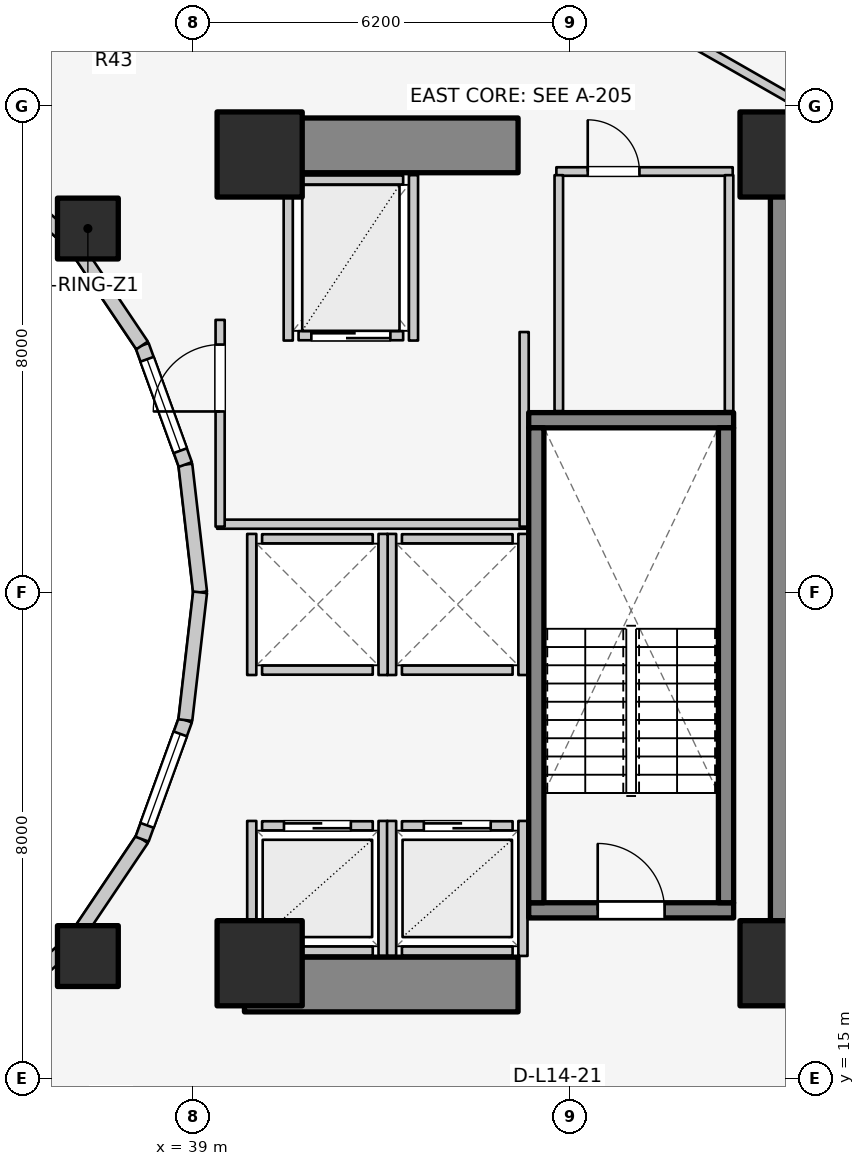
"""IFC4 building model, lengths in metres.
Left out: names, types, materials, properties, quantities, classifications, styles, units other than length and angle.
Written with IfcOpenShell. Run it as: python <this file> out.ifc"""

import sys

from ifc_helpers import new_model, si_unit, direction, frame, frame_2d, origin, origin_2d, place, context, subcontext, project, spatial, rectangle, extrude, element, fill, save


model = new_model("IFC4")
c1 = context("Model", 3, precision=1e-05, world=origin(), true_north=direction((0.0, 1.0)))
c2 = subcontext(c1, "Body", "Model", "MODEL_VIEW")
j1 = project(units=[si_unit("LENGTHUNIT", "METRE"), si_unit("PLANEANGLEUNIT", "RADIAN")], contexts=[c1])
p1 = place(None, origin())
s1 = spatial("IfcSite", under=j1, at=p1, CompositionType="ELEMENT")
p2 = place(p1, origin())
s2 = spatial("IfcBuilding", under=s1, at=p2, CompositionType="ELEMENT")
p3 = place(p2, frame((0.0, 0.0, 49.3)))
s3 = spatial("IfcBuildingStorey", under=s2, at=p3, CompositionType="ELEMENT", Elevation=49.3)
p4 = place(p3, frame((48.95, 17.05, 0.0), z_axis=(0.0, 0.0, 1.0), x_axis=(0.0, 1.0, 0.0)))
e1 = element("IfcWall", 1, at=p4, inside=s3, PredefinedType="SHEAR", context=c2, shape_type="SweptSolid", body=[
    extrude(rectangle(XDim=12.8, YDim=0.9, at=frame_2d((6.4, 0.0))), origin(), (0.0, 0.0, 1.0), 3.1),
])
for number, where, z_axis, x_axis in (
    (2, (39.85, 16.55, 0.0), (0.0, 0.0, 1.0), (1.0, 0.0, 0.0)),
    (3, (39.85, 30.35, 0.0), (0.0, 0.0, 1.0), (1.0, 0.0, 0.0)),
):
    element("IfcWall", number, at=place(p3, frame(where, z_axis=z_axis, x_axis=x_axis)), inside=s3, PredefinedType="SHEAR", context=c2, shape_type="SweptSolid", body=[
        extrude(rectangle(XDim=4.5, YDim=0.9, at=frame_2d((2.25, 0.0))), origin(), (0.0, 0.0, 1.0), 3.1),
    ])
p5 = place(p3, frame((44.525, 17.77, 0.0), z_axis=(0.0, 0.0, 1.0), x_axis=(1.0, 0.0, 0.0)))
e4 = element("IfcWall", 4, at=p5, inside=s3, PredefinedType="SOLIDWALL", context=c2, shape_type="SweptSolid", body=[
    extrude(rectangle(XDim=3.37, YDim=0.25, at=frame_2d((1.685, 0.0))), origin(), (0.0, 0.0, 1.0), 3.1),
])
p6 = place(p5, frame((1.135, 0.0, 0.0)))
e5 = element("IfcOpeningElement", 5, at=p6, cuts=e4, PredefinedType="OPENING", context=c2, shape_type="SweptSolid", body=[
    extrude(rectangle(XDim=1.1, YDim=2.1, at=frame_2d((0.55, 1.05))), frame((0.0, 0.135, 0.0), z_axis=(0.0, -1.0, 0.0), x_axis=(1.0, 0.0, 0.0)), (0.0, 0.0, 1.0), 0.27),
])
p7 = place(p3, frame((44.525, 25.83, 0.0), z_axis=(0.0, 0.0, 1.0), x_axis=(1.0, 0.0, 0.0)))
e6 = element("IfcWall", 6, at=p7, inside=s3, PredefinedType="SOLIDWALL", context=c2, shape_type="SweptSolid", body=[
    extrude(rectangle(XDim=3.37, YDim=0.25, at=frame_2d((1.685, 0.0))), origin(), (0.0, 0.0, 1.0), 3.1),
])
for number, where, z_axis, x_axis in (
    (7, (44.65, 17.895, 0.0), (0.0, 0.0, 1.0), (0.0, 1.0, 0.0)),
    (8, (47.77, 17.895, 0.0), (0.0, 0.0, 1.0), (0.0, 1.0, 0.0)),
):
    element("IfcWall", number, at=place(p3, frame(where, z_axis=z_axis, x_axis=x_axis)), inside=s3, PredefinedType="SOLIDWALL", context=c2, shape_type="SweptSolid", body=[
        extrude(rectangle(XDim=7.81, YDim=0.25, at=frame_2d((3.905, 0.0))), origin(), (0.0, 0.0, 1.0), 3.1),
    ])
for number, where, z_axis, x_axis in (
    (9, (40.1, 16.9, 0.0), (0.0, 0.0, 1.0), (1.0, 0.0, 0.0)),
    (10, (48.7, 16.9, 0.0), (0.0, 0.0, 1.0), (1.0, 0.0, 0.0)),
    (11, (48.7, 30.2, 0.0), (0.0, 0.0, 1.0), (1.0, 0.0, 0.0)),
    (12, (40.1, 30.2, 0.0), (0.0, 0.0, 1.0), (1.0, 0.0, 0.0)),
):
    element("IfcColumn", number, at=place(p3, frame(where, z_axis=z_axis, x_axis=x_axis)), inside=s3, PredefinedType="COLUMN", context=c2, shape_type="SweptSolid", body=[
        extrude(rectangle(XDim=1.4, YDim=1.4, at=origin_2d()), origin(), (0.0, 0.0, 1.0), 3.1),
    ])
for number, where, z_axis, x_axis in (
    (13, (37.275, 28.982, 0.0), (0.0, 0.0, 1.0), (1.0, 0.0, 0.0)),
    (14, (37.275, 17.018, 0.0), (0.0, 0.0, 1.0), (1.0, 0.0, 0.0)),
):
    element("IfcColumn", number, at=place(p3, frame(where, z_axis=z_axis, x_axis=x_axis)), inside=s3, PredefinedType="COLUMN", context=c2, shape_type="SweptSolid", body=[
        extrude(rectangle(XDim=1.0, YDim=1.0, at=origin_2d()), origin(), (0.0, 0.0, 1.0), 3.1),
    ])
p8 = place(p3, frame((39.12, 23.0, 0.0), z_axis=(0.0, 0.0, 1.0), x_axis=(-0.114711713601, 0.993398823617, 0.0)))
e15 = element("IfcWall", 15, at=p8, inside=s3, PredefinedType="STANDARD", context=c2, shape_type="SweptSolid", body=[
    extrude(rectangle(XDim=2.115, YDim=0.23, at=frame_2d((1.058, 0.0))), origin(), (0.0, 0.0, 1.0), 2.84),
])
p9 = place(p3, frame((38.877, 25.102, 0.0), z_axis=(0.0, 0.0, 1.0), x_axis=(-0.341423187295, 0.93990968033, 0.0)))
e16 = element("IfcWall", 16, at=p9, inside=s3, PredefinedType="STANDARD", context=c2, shape_type="SweptSolid", body=[
    extrude(rectangle(XDim=2.084, YDim=0.23, at=frame_2d((1.042, 0.0))), origin(), (0.0, 0.0, 1.0), 2.84),
])
p10 = place(p9, frame((0.242, 0.0, 0.85)))
e17 = element("IfcOpeningElement", 17, at=p10, cuts=e16, PredefinedType="OPENING", context=c2, shape_type="SweptSolid", body=[
    extrude(rectangle(XDim=1.6, YDim=1.65, at=frame_2d((0.8, 0.825))), frame((0.0, 0.125, 0.0), z_axis=(0.0, -1.0, 0.0), x_axis=(1.0, 0.0, 0.0)), (0.0, 0.0, 1.0), 0.25),
])
p11 = place(p3, frame((38.166, 27.06, 0.0), z_axis=(0.0, 0.0, 1.0), x_axis=(-0.558197800898, 0.829707909492, 0.0)))
e18 = element("IfcWall", 18, at=p11, inside=s3, PredefinedType="STANDARD", context=c2, shape_type="SweptSolid", body=[
    extrude(rectangle(XDim=2.027, YDim=0.23, at=frame_2d((1.013, 0.0))), origin(), (0.0, 0.0, 1.0), 2.16),
])
for number, where, z_axis, x_axis in (
    (19, (37.035, 28.742, 0.0), (0.0, 0.0, 1.0), (-0.753, 0.659, 0.0)),
    (20, (35.56, 15.968, 0.0), (0.0, 0.0, 1.0), (0.753, 0.659, 0.0)),
):
    element("IfcWall", number, at=place(p3, frame(where, z_axis=z_axis, x_axis=x_axis)), inside=s3, PredefinedType="STANDARD", context=c2, shape_type="SweptSolid", body=[
        extrude(rectangle(XDim=1.959, YDim=0.23, at=frame_2d((0.98, 0.0))), origin(), (0.0, 0.0, 1.0), 2.16),
    ])
p12 = place(p3, frame((37.035, 17.258, 0.0), z_axis=(0.0, 0.0, 1.0), x_axis=(0.558197800898, 0.829707909492, 0.0)))
e21 = element("IfcWall", 21, at=p12, inside=s3, PredefinedType="STANDARD", context=c2, shape_type="SweptSolid", body=[
    extrude(rectangle(XDim=2.027, YDim=0.23, at=frame_2d((1.013, 0.0))), origin(), (0.0, 0.0, 1.0), 2.16),
])
p13 = place(p3, frame((38.166, 18.94, 0.0), z_axis=(0.0, 0.0, 1.0), x_axis=(0.341423187295, 0.93990968033, 0.0)))
e22 = element("IfcWall", 22, at=p13, inside=s3, PredefinedType="STANDARD", context=c2, shape_type="SweptSolid", body=[
    extrude(rectangle(XDim=2.084, YDim=0.23, at=frame_2d((1.042, 0.0))), origin(), (0.0, 0.0, 1.0), 2.84),
])
p14 = place(p13, frame((0.242, 0.0, 0.85)))
e23 = element("IfcOpeningElement", 23, at=p14, cuts=e22, PredefinedType="OPENING", context=c2, shape_type="SweptSolid", body=[
    extrude(rectangle(XDim=1.6, YDim=1.65, at=frame_2d((0.8, 0.825))), frame((0.0, 0.125, 0.0), z_axis=(0.0, -1.0, 0.0), x_axis=(1.0, 0.0, 0.0)), (0.0, 0.0, 1.0), 0.25),
])
p15 = place(p3, frame((38.877, 20.898, 0.0), z_axis=(0.0, 0.0, 1.0), x_axis=(0.114711713601, 0.993398823617, 0.0)))
e24 = element("IfcWall", 24, at=p15, inside=s3, PredefinedType="STANDARD", context=c2, shape_type="SweptSolid", body=[
    extrude(rectangle(XDim=2.115, YDim=0.23, at=frame_2d((1.058, 0.0))), origin(), (0.0, 0.0, 1.0), 2.84),
])
p16 = place(p3, frame((40.14, 19.16, 0.0), z_axis=(0.0, 0.0, 1.0), x_axis=(1.0, 0.0, 0.0)))
e25 = element("IfcWall", 25, at=p16, inside=s3, PredefinedType="SOLIDWALL", context=c2, shape_type="SweptSolid", body=[
    extrude(rectangle(XDim=1.82, YDim=0.15, at=frame_2d((0.91, 0.0))), origin(), (0.0, 0.0, 1.0), 2.12),
])
p17 = place(p16, frame((0.36, 0.0, 0.0)))
e26 = element("IfcOpeningElement", 26, at=p17, cuts=e25, PredefinedType="OPENING", context=c2, shape_type="SweptSolid", body=[
    extrude(rectangle(XDim=1.1, YDim=2.1, at=frame_2d((0.55, 1.05))), frame((0.0, 0.085, 0.0), z_axis=(0.0, -1.0, 0.0), x_axis=(1.0, 0.0, 0.0)), (0.0, 0.0, 1.0), 0.17),
])
p18 = place(p3, frame((40.14, 17.1, 0.0), z_axis=(0.0, 0.0, 1.0), x_axis=(1.0, 0.0, 0.0)))
e27 = element("IfcWall", 27, at=p18, inside=s3, PredefinedType="SOLIDWALL", context=c2, shape_type="SweptSolid", body=[
    extrude(rectangle(XDim=1.82, YDim=0.15, at=frame_2d((0.91, 0.0))), origin(), (0.0, 0.0, 1.0), 2.12),
])
p19 = place(p3, frame((39.97, 17.02, 0.0), z_axis=(0.0, 0.0, 1.0), x_axis=(0.0, 1.0, 0.0)))
e28 = element("IfcWall", 28, at=p19, inside=s3, PredefinedType="SOLIDWALL", context=c2, shape_type="SweptSolid", body=[
    extrude(rectangle(XDim=2.22, YDim=0.15, at=frame_2d((1.11, 0.0))), origin(), (0.0, 0.0, 1.0), 2.12),
])
p20 = place(p3, frame((42.13, 17.02, 0.0), z_axis=(0.0, 0.0, 1.0), x_axis=(0.0, 1.0, 0.0)))
e29 = element("IfcWall", 29, at=p20, inside=s3, PredefinedType="SOLIDWALL", context=c2, shape_type="SweptSolid", body=[
    extrude(rectangle(XDim=2.22, YDim=0.15, at=frame_2d((1.11, 0.0))), origin(), (0.0, 0.0, 1.0), 2.855),
])
p21 = place(p3, frame((42.44, 19.16, 0.0), z_axis=(0.0, 0.0, 1.0), x_axis=(1.0, 0.0, 0.0)))
e30 = element("IfcWall", 30, at=p21, inside=s3, PredefinedType="SOLIDWALL", context=c2, shape_type="SweptSolid", body=[
    extrude(rectangle(XDim=1.82, YDim=0.15, at=frame_2d((0.91, 0.0))), origin(), (0.0, 0.0, 1.0), 2.855),
])
p22 = place(p21, frame((0.36, 0.0, 0.0)))
e31 = element("IfcOpeningElement", 31, at=p22, cuts=e30, PredefinedType="OPENING", context=c2, shape_type="SweptSolid", body=[
    extrude(rectangle(XDim=1.1, YDim=2.1, at=frame_2d((0.55, 1.05))), frame((0.0, 0.085, 0.0), z_axis=(0.0, -1.0, 0.0), x_axis=(1.0, 0.0, 0.0)), (0.0, 0.0, 1.0), 0.17),
])
p23 = place(p3, frame((42.44, 17.1, 0.0), z_axis=(0.0, 0.0, 1.0), x_axis=(1.0, 0.0, 0.0)))
e32 = element("IfcWall", 32, at=p23, inside=s3, PredefinedType="SOLIDWALL", context=c2, shape_type="SweptSolid", body=[
    extrude(rectangle(XDim=1.82, YDim=0.15, at=frame_2d((0.91, 0.0))), origin(), (0.0, 0.0, 1.0), 2.855),
])
p24 = place(p3, frame((42.27, 17.02, 0.0), z_axis=(0.0, 0.0, 1.0), x_axis=(0.0, 1.0, 0.0)))
e33 = element("IfcWall", 33, at=p24, inside=s3, PredefinedType="SOLIDWALL", context=c2, shape_type="SweptSolid", body=[
    extrude(rectangle(XDim=2.22, YDim=0.15, at=frame_2d((1.11, 0.0))), origin(), (0.0, 0.0, 1.0), 2.855),
])
p25 = place(p3, frame((44.43, 17.02, 0.0), z_axis=(0.0, 0.0, 1.0), x_axis=(0.0, 1.0, 0.0)))
e34 = element("IfcWall", 34, at=p25, inside=s3, PredefinedType="SOLIDWALL", context=c2, shape_type="SweptSolid", body=[
    extrude(rectangle(XDim=2.22, YDim=0.15, at=frame_2d((1.11, 0.0))), origin(), (0.0, 0.0, 1.0), 2.12),
])
for number, where, z_axis, x_axis in (
    (35, (42.44, 21.72, 0.0), (0.0, 0.0, 1.0), (1.0, 0.0, 0.0)),
    (36, (42.44, 23.88, 0.0), (0.0, 0.0, 1.0), (1.0, 0.0, 0.0)),
):
    element("IfcWall", number, at=place(p3, frame(where, z_axis=z_axis, x_axis=x_axis)), inside=s3, PredefinedType="SOLIDWALL", context=c2, shape_type="SweptSolid", body=[
        extrude(rectangle(XDim=1.82, YDim=0.15, at=frame_2d((0.91, 0.0))), origin(), (0.0, 0.0, 1.0), 2.855),
    ])
for number, where, z_axis, x_axis in (
    (37, (42.27, 21.64, 0.0), (0.0, 0.0, 1.0), (0.0, 1.0, 0.0)),
    (38, (44.43, 21.64, 0.0), (0.0, 0.0, 1.0), (0.0, 1.0, 0.0)),
):
    element("IfcWall", number, at=place(p3, frame(where, z_axis=z_axis, x_axis=x_axis)), inside=s3, PredefinedType="SOLIDWALL", context=c2, shape_type="SweptSolid", body=[
        extrude(rectangle(XDim=2.32, YDim=0.15, at=frame_2d((1.16, 0.0))), origin(), (0.0, 0.0, 1.0), 2.855),
    ])
for number, where, z_axis, x_axis in (
    (39, (40.14, 21.72, 0.0), (0.0, 0.0, 1.0), (1.0, 0.0, 0.0)),
    (40, (40.14, 23.88, 0.0), (0.0, 0.0, 1.0), (1.0, 0.0, 0.0)),
):
    element("IfcWall", number, at=place(p3, frame(where, z_axis=z_axis, x_axis=x_axis)), inside=s3, PredefinedType="SOLIDWALL", context=c2, shape_type="SweptSolid", body=[
        extrude(rectangle(XDim=1.82, YDim=0.15, at=frame_2d((0.91, 0.0))), origin(), (0.0, 0.0, 1.0), 2.12),
    ])
p26 = place(p3, frame((39.97, 21.64, 0.0), z_axis=(0.0, 0.0, 1.0), x_axis=(0.0, 1.0, 0.0)))
e41 = element("IfcWall", 41, at=p26, inside=s3, PredefinedType="SOLIDWALL", context=c2, shape_type="SweptSolid", body=[
    extrude(rectangle(XDim=2.32, YDim=0.15, at=frame_2d((1.16, 0.0))), origin(), (0.0, 0.0, 1.0), 2.12),
])
p27 = place(p3, frame((42.13, 21.64, 0.0), z_axis=(0.0, 0.0, 1.0), x_axis=(0.0, 1.0, 0.0)))
e42 = element("IfcWall", 42, at=p27, inside=s3, PredefinedType="SOLIDWALL", context=c2, shape_type="SweptSolid", body=[
    extrude(rectangle(XDim=2.32, YDim=0.15, at=frame_2d((1.16, 0.0))), origin(), (0.0, 0.0, 1.0), 2.855),
])
p28 = place(p3, frame((40.74, 27.22, 0.0), z_axis=(0.0, 0.0, 1.0), x_axis=(1.0, 0.0, 0.0)))
e43 = element("IfcWall", 43, at=p28, inside=s3, PredefinedType="SOLIDWALL", context=c2, shape_type="SweptSolid", body=[
    extrude(rectangle(XDim=1.72, YDim=0.15, at=frame_2d((0.86, 0.0))), origin(), (0.0, 0.0, 1.0), 2.855),
])
p29 = place(p28, frame((0.21, 0.0, 0.0)))
e44 = element("IfcOpeningElement", 44, at=p29, cuts=e43, PredefinedType="OPENING", context=c2, shape_type="SweptSolid", body=[
    extrude(rectangle(XDim=1.3, YDim=2.1, at=frame_2d((0.65, 1.05))), frame((0.0, 0.085, 0.0), z_axis=(0.0, -1.0, 0.0), x_axis=(1.0, 0.0, 0.0)), (0.0, 0.0, 1.0), 0.17),
])
p30 = place(p3, frame((40.74, 29.78, 0.0), z_axis=(0.0, 0.0, 1.0), x_axis=(1.0, 0.0, 0.0)))
e45 = element("IfcWall", 45, at=p30, inside=s3, PredefinedType="SOLIDWALL", context=c2, shape_type="SweptSolid", body=[
    extrude(rectangle(XDim=1.72, YDim=0.15, at=frame_2d((0.86, 0.0))), origin(), (0.0, 0.0, 1.0), 2.855),
])
for number, where, z_axis, x_axis in (
    (46, (40.57, 27.14, 0.0), (0.0, 0.0, 1.0), (0.0, 1.0, 0.0)),
    (47, (42.63, 27.14, 0.0), (0.0, 0.0, 1.0), (0.0, 1.0, 0.0)),
):
    element("IfcWall", number, at=place(p3, frame(where, z_axis=z_axis, x_axis=x_axis)), inside=s3, PredefinedType="SOLIDWALL", context=c2, shape_type="SweptSolid", body=[
        extrude(rectangle(XDim=2.72, YDim=0.15, at=frame_2d((1.36, 0.0))), origin(), (0.0, 0.0, 1.0), 2.855),
    ])
p31 = place(p3, frame((39.4, 24.12, 0.0), z_axis=(0.0, 0.0, 1.0), x_axis=(1.0, 0.0, 0.0)))
e48 = element("IfcWall", 48, at=p31, inside=s3, PredefinedType="PARTITIONING", context=c2, shape_type="SweptSolid", body=[
    extrude(rectangle(XDim=5.08, YDim=0.15, at=frame_2d((2.54, 0.0))), origin(), (0.0, 0.0, 1.0), 2.12),
])
p32 = place(p3, frame((44.45, 24.08, 0.0), z_axis=(0.0, 0.0, 1.0), x_axis=(0.0, 1.0, 0.0)))
e49 = element("IfcWall", 49, at=p32, inside=s3, PredefinedType="PARTITIONING", context=c2, shape_type="SweptSolid", body=[
    extrude(rectangle(XDim=3.2, YDim=0.15, at=frame_2d((1.6, 0.0))), origin(), (0.0, 0.0, 1.0), 2.855),
])
p33 = place(p3, frame((39.45, 24.08, 0.0), z_axis=(0.0, 0.0, 1.0), x_axis=(0.0, 1.0, 0.0)))
e50 = element("IfcWall", 50, at=p33, inside=s3, PredefinedType="PARTITIONING", context=c2, shape_type="SweptSolid", body=[
    extrude(rectangle(XDim=3.4, YDim=0.15, at=frame_2d((1.7, 0.0))), origin(), (0.0, 0.0, 1.0), 2.855),
])
p34 = place(p33, frame((1.894, 0.0, 0.0)))
e51 = element("IfcOpeningElement", 51, at=p34, cuts=e50, PredefinedType="OPENING", context=c2, shape_type="SweptSolid", body=[
    extrude(rectangle(XDim=1.1, YDim=2.1, at=frame_2d((0.55, 1.05))), frame((0.0, 0.085, 0.0), z_axis=(0.0, -1.0, 0.0), x_axis=(1.0, 0.0, 0.0)), (0.0, 0.0, 1.0), 0.17),
])
p35 = place(p3, frame((44.98, 29.92, 0.0), z_axis=(0.0, 0.0, 1.0), x_axis=(1.0, 0.0, 0.0)))
e52 = element("IfcWall", 52, at=p35, inside=s3, PredefinedType="PLUMBINGWALL", context=c2, shape_type="SweptSolid", body=[
    extrude(rectangle(XDim=2.9, YDim=0.14, at=frame_2d((1.45, 0.0))), origin(), (0.0, 0.0, 1.0), 2.855),
])
p36 = place(p35, frame((0.516, 0.0, 0.0)))
e53 = element("IfcOpeningElement", 53, at=p36, cuts=e52, PredefinedType="OPENING", context=c2, shape_type="SweptSolid", body=[
    extrude(rectangle(XDim=0.85, YDim=2.05, at=frame_2d((0.425, 1.025))), frame((0.0, 0.08, 0.0), z_axis=(0.0, -1.0, 0.0), x_axis=(1.0, 0.0, 0.0)), (0.0, 0.0, 1.0), 0.16),
])
for number, where, z_axis, x_axis in (
    (54, (45.02, 25.98, 0.0), (0.0, 0.0, 1.0), (0.0, 1.0, 0.0)),
    (55, (47.82, 25.98, 0.0), (0.0, 0.0, 1.0), (0.0, 1.0, 0.0)),
):
    element("IfcWall", number, at=place(p3, frame(where, z_axis=z_axis, x_axis=x_axis)), inside=s3, PredefinedType="PLUMBINGWALL", context=c2, shape_type="SweptSolid", body=[
        extrude(rectangle(XDim=3.88, YDim=0.14, at=frame_2d((1.94, 0.0))), origin(), (0.0, 0.0, 1.0), 2.855),
    ])
p37 = place(p3, frame((46.757, 32.305, 0.0), z_axis=(0.0, 0.0, 1.0), x_axis=(0.867991349648, -0.496579315857, 0.0)))
e56 = element("IfcWall", 56, at=p37, inside=s3, PredefinedType="PARTITIONING", context=c2, shape_type="SweptSolid", body=[
    extrude(rectangle(XDim=2.567, YDim=0.15, at=frame_2d((1.283, 0.0))), origin(), (0.0, 0.0, 1.0), 2.069),
])
p38 = place(p10, origin())
e57 = element("IfcWindow", 57, at=p38, inside=s3, PartitioningType="SINGLE_PANEL", PredefinedType="WINDOW", context=c2, shape_type="SweptSolid", body=[
    extrude(rectangle(XDim=1.6, YDim=1.65, at=frame_2d((0.8, 0.825))), frame((0.0, 0.03, 0.0), z_axis=(0.0, -1.0, 0.0), x_axis=(1.0, 0.0, 0.0)), (0.0, 0.0, 1.0), 0.06),
])
fill(e17, e57)
p39 = place(p14, origin())
e58 = element("IfcWindow", 58, at=p39, inside=s3, PartitioningType="SINGLE_PANEL", PredefinedType="WINDOW", context=c2, shape_type="SweptSolid", body=[
    extrude(rectangle(XDim=1.6, YDim=1.65, at=frame_2d((0.8, 0.825))), frame((0.0, 0.03, 0.0), z_axis=(0.0, -1.0, 0.0), x_axis=(1.0, 0.0, 0.0)), (0.0, 0.0, 1.0), 0.06),
])
fill(e23, e58)
p40 = place(p6, origin())
e59 = element("IfcDoor", 59, at=p40, inside=s3, OperationType="SINGLE_SWING_LEFT", PredefinedType="DOOR", context=c2, shape_type="SweptSolid", body=[
    extrude(rectangle(XDim=1.1, YDim=2.1, at=frame_2d((0.55, 1.05))), frame((0.0, 0.025, 0.0), z_axis=(0.0, -1.0, 0.0), x_axis=(1.0, 0.0, 0.0)), (0.0, 0.0, 1.0), 0.05),
])
fill(e5, e59)
p41 = place(p17, origin())
e60 = element("IfcDoor", 60, at=p41, inside=s3, OperationType="DOUBLE_DOOR_SLIDING", PredefinedType="DOOR", context=c2, shape_type="SweptSolid", body=[
    extrude(rectangle(XDim=1.1, YDim=2.1, at=frame_2d((0.55, 1.05))), frame((0.0, 0.025, 0.0), z_axis=(0.0, -1.0, 0.0), x_axis=(1.0, 0.0, 0.0)), (0.0, 0.0, 1.0), 0.05),
])
fill(e26, e60)
p42 = place(p22, origin())
e61 = element("IfcDoor", 61, at=p42, inside=s3, OperationType="DOUBLE_DOOR_SLIDING", PredefinedType="DOOR", context=c2, shape_type="SweptSolid", body=[
    extrude(rectangle(XDim=1.1, YDim=2.1, at=frame_2d((0.55, 1.05))), frame((0.0, 0.025, 0.0), z_axis=(0.0, -1.0, 0.0), x_axis=(1.0, 0.0, 0.0)), (0.0, 0.0, 1.0), 0.05),
])
fill(e31, e61)
p43 = place(p29, origin())
e62 = element("IfcDoor", 62, at=p43, inside=s3, OperationType="DOUBLE_DOOR_SLIDING", PredefinedType="DOOR", context=c2, shape_type="SweptSolid", body=[
    extrude(rectangle(XDim=1.3, YDim=2.1, at=frame_2d((0.65, 1.05))), frame((0.0, 0.025, 0.0), z_axis=(0.0, -1.0, 0.0), x_axis=(1.0, 0.0, 0.0)), (0.0, 0.0, 1.0), 0.05),
])
fill(e44, e62)
p44 = place(p34, origin())
e63 = element("IfcDoor", 63, at=p44, inside=s3, OperationType="SINGLE_SWING_LEFT", PredefinedType="DOOR", context=c2, shape_type="SweptSolid", body=[
    extrude(rectangle(XDim=1.1, YDim=2.1, at=frame_2d((0.55, 1.05))), frame((0.0, 0.025, 0.0), z_axis=(0.0, -1.0, 0.0), x_axis=(1.0, 0.0, 0.0)), (0.0, 0.0, 1.0), 0.05),
])
fill(e51, e63)
p45 = place(p36, origin())
e64 = element("IfcDoor", 64, at=p45, inside=s3, OperationType="SINGLE_SWING_LEFT", PredefinedType="DOOR", context=c2, shape_type="SweptSolid", body=[
    extrude(rectangle(XDim=0.85, YDim=2.05, at=frame_2d((0.425, 1.025))), frame((0.0, 0.025, 0.0), z_axis=(0.0, -1.0, 0.0), x_axis=(1.0, 0.0, 0.0)), (0.0, 0.0, 1.0), 0.05),
])
fill(e53, e64)
save(model, sys.argv[1])
